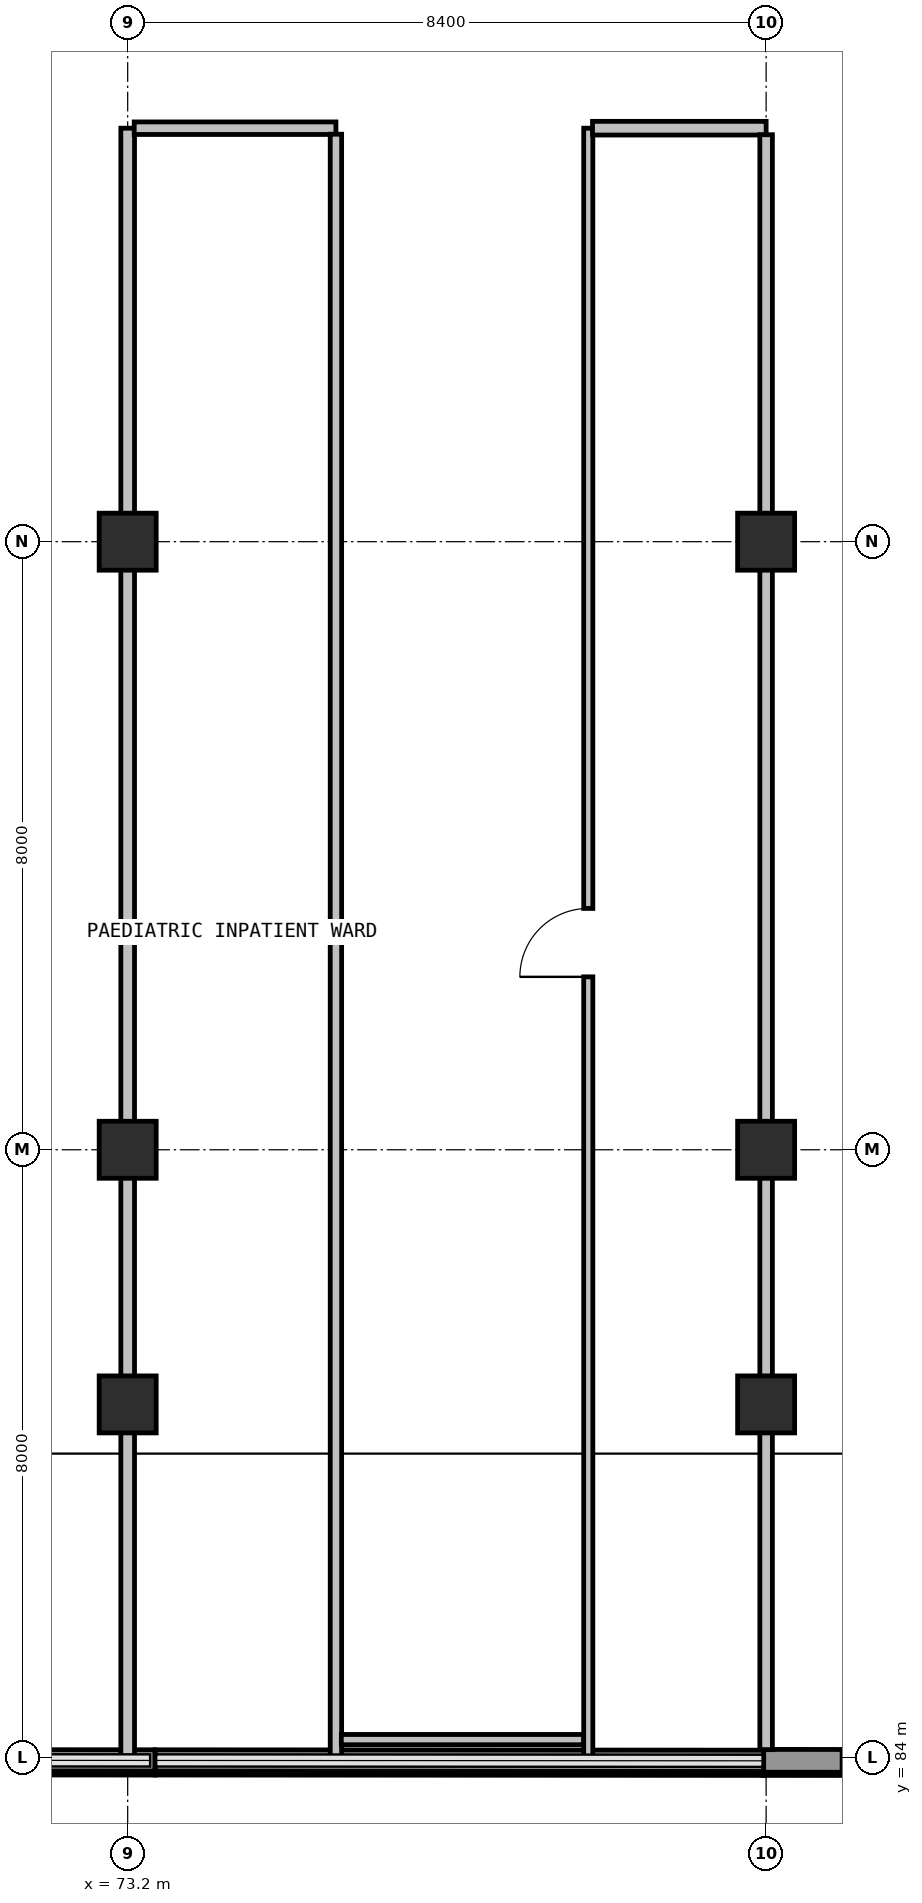
"""IFC4 building model, lengths in metres.
Left out: names, types, materials, properties, quantities, classifications, styles, units other than length and angle.
Written with IfcOpenShell. Run it as: python <this file> out.ifc"""

import sys

from ifc_helpers import new_model, si_unit, direction, frame, frame_2d, origin, origin_2d, place, context, subcontext, project, spatial, rectangle, extrude, element, fill, save


model = new_model("IFC4")
c1 = context("Model", 3, precision=1e-05, world=origin(), true_north=direction((0.0, 1.0)))
c2 = subcontext(c1, "Body", "Model", "MODEL_VIEW")
j1 = project(units=[si_unit("LENGTHUNIT", "METRE"), si_unit("PLANEANGLEUNIT", "RADIAN")], contexts=[c1])
p1 = place(None, origin())
s1 = spatial("IfcSite", under=j1, at=p1, CompositionType="ELEMENT")
p2 = place(p1, origin())
s2 = spatial("IfcBuilding", under=s1, at=p2, CompositionType="ELEMENT")
p3 = place(p2, frame((0.0, 0.0, 19.2)))
s3 = spatial("IfcBuildingStorey", under=s2, at=p3, CompositionType="ELEMENT", Elevation=19.2)
for number, where, z_axis, x_axis in (
    (1, (73.2, 88.65, 0.0), (0.0, 0.0, 1.0), (1.0, 0.0, 0.0)),
    (2, (73.2, 92.0, 0.0), (0.0, 0.0, 1.0), (1.0, 0.0, 0.0)),
    (3, (73.2, 100.0, 0.0), (0.0, 0.0, 1.0), (1.0, 0.0, 0.0)),
    (4, (81.6, 88.65, 0.0), (0.0, 0.0, 1.0), (1.0, 0.0, 0.0)),
    (5, (81.6, 92.0, 0.0), (0.0, 0.0, 1.0), (1.0, 0.0, 0.0)),
    (6, (81.6, 100.0, 0.0), (0.0, 0.0, 1.0), (1.0, 0.0, 0.0)),
):
    element("IfcColumn", number, at=place(p3, frame(where, z_axis=z_axis, x_axis=x_axis)), inside=s3, PredefinedType="COLUMN", context=c2, shape_type="SweptSolid", body=[
        extrude(rectangle(XDim=0.75, YDim=0.75, at=origin_2d()), origin(), (0.0, 0.0, 1.0), 4.05),
    ])
p4 = place(p3, frame((89.576, 83.956, 0.0), z_axis=(0.0, 0.0, 1.0), x_axis=(-0.999999814099, 0.000609755984, 0.0)))
e7 = element("IfcWall", 7, at=p4, inside=s3, PredefinedType="SOLIDWALL", context=c2, shape_type="SweptSolid", body=[
    extrude(rectangle(XDim=8.008, YDim=0.3, at=frame_2d((4.004, 0.0))), origin(), (0.0, 0.0, 1.0), 3.77),
])
p5 = place(p4, frame((1.032, 0.0, 0.96)))
e8 = element("IfcOpeningElement", 8, at=p5, cuts=e7, PredefinedType="OPENING", context=c2, shape_type="SweptSolid", body=[
    extrude(rectangle(XDim=2.1, YDim=1.5, at=frame_2d((1.05, 0.75))), frame((0.0, 0.16, 0.0), z_axis=(0.0, -1.0, 0.0), x_axis=(1.0, 0.0, 0.0)), (0.0, 0.0, 1.0), 0.32),
])
p6 = place(p4, frame((4.876, 0.0, 0.96)))
e9 = element("IfcOpeningElement", 9, at=p6, cuts=e7, PredefinedType="OPENING", context=c2, shape_type="SweptSolid", body=[
    extrude(rectangle(XDim=2.1, YDim=1.5, at=frame_2d((1.05, 0.75))), frame((0.0, 0.16, 0.0), z_axis=(0.0, -1.0, 0.0), x_axis=(1.0, 0.0, 0.0)), (0.0, 0.0, 1.0), 0.32),
])
p7 = place(p3, frame((81.566, 83.961, 0.0), z_axis=(0.0, 0.0, 1.0), x_axis=(-0.999999794844, 0.000640556238, 0.0)))
e10 = element("IfcWall", 10, at=p7, inside=s3, PredefinedType="SOLIDWALL", context=c2, shape_type="SweptSolid", body=[
    extrude(rectangle(XDim=8.004, YDim=0.28, at=frame_2d((4.002, 0.0))), origin(), (0.0, 0.0, 1.0), 0.94),
])
p8 = place(p3, frame((73.558, 83.966, 0.0), z_axis=(0.0, 0.0, 1.0), x_axis=(-0.999999732057, 0.000732041896, 0.0)))
e11 = element("IfcWall", 11, at=p8, inside=s3, PredefinedType="SOLIDWALL", context=c2, shape_type="SweptSolid", body=[
    extrude(rectangle(XDim=8.004, YDim=0.28, at=frame_2d((4.002, 0.0))), origin(), (0.0, 0.0, 1.0), 0.94),
])
p9 = place(p3, frame((73.2, 105.44, 0.0), z_axis=(0.0, 0.0, 1.0), x_axis=(0.0, -1.0, 0.0)))
e12 = element("IfcWall", 12, at=p9, inside=s3, PredefinedType="PARTITIONING", context=c2, shape_type="SweptSolid", body=[
    extrude(rectangle(XDim=21.43, YDim=0.18, at=frame_2d((10.715, 0.0))), origin(), (0.0, 0.0, 1.0), 3.12),
])
p10 = place(p3, frame((73.286, 105.44, 0.0), z_axis=(0.0, 0.0, 1.0), x_axis=(1.0, 0.0, 0.0)))
e13 = element("IfcWall", 13, at=p10, inside=s3, PredefinedType="PARTITIONING", context=c2, shape_type="SweptSolid", body=[
    extrude(rectangle(XDim=2.654, YDim=0.165, at=frame_2d((1.327, 0.0))), origin(), (0.0, 0.0, 1.0), 3.07),
])
p11 = place(p3, frame((75.94, 105.361, 0.0), z_axis=(0.0, 0.0, 1.0), x_axis=(0.0, -1.0, 0.0)))
e14 = element("IfcWall", 14, at=p11, inside=s3, PredefinedType="PARTITIONING", context=c2, shape_type="SweptSolid", body=[
    extrude(rectangle(XDim=21.351, YDim=0.15, at=frame_2d((10.676, 0.0))), origin(), (0.0, 0.0, 1.0), 3.77),
])
p12 = place(p3, frame((76.011, 84.24, 0.0), z_axis=(0.0, 0.0, 1.0), x_axis=(1.0, 0.0, 0.0)))
e15 = element("IfcWall", 15, at=p12, inside=s3, PredefinedType="PARTITIONING", context=c2, shape_type="SweptSolid", body=[
    extrude(rectangle(XDim=3.189, YDim=0.135, at=frame_2d((1.594, 0.0))), origin(), (0.0, 0.0, 1.0), 3.77),
])
p13 = place(p3, frame((79.26, 84.01, 0.0), z_axis=(0.0, 0.0, 1.0), x_axis=(0.0, 1.0, 0.0)))
e16 = element("IfcWall", 16, at=p13, inside=s3, PredefinedType="PARTITIONING", context=c2, shape_type="SweptSolid", body=[
    extrude(rectangle(XDim=21.43, YDim=0.12, at=frame_2d((10.715, 0.0))), origin(), (0.0, 0.0, 1.0), 3.77),
])
p14 = place(p13, frame((10.265, 0.0, 0.0)))
e17 = element("IfcOpeningElement", 17, at=p14, cuts=e16, PredefinedType="OPENING", context=c2, shape_type="SweptSolid", body=[
    extrude(rectangle(XDim=0.9, YDim=2.1, at=frame_2d((0.45, 1.05))), frame((0.0, 0.07, 0.0), z_axis=(0.0, -1.0, 0.0), x_axis=(1.0, 0.0, 0.0)), (0.0, 0.0, 1.0), 0.14),
])
p15 = place(p3, frame((79.316, 105.44, 0.0), z_axis=(0.0, 0.0, 1.0), x_axis=(1.0, 0.0, 0.0)))
e18 = element("IfcWall", 18, at=p15, inside=s3, PredefinedType="PARTITIONING", context=c2, shape_type="SweptSolid", body=[
    extrude(rectangle(XDim=2.284, YDim=0.18, at=frame_2d((1.142, 0.0))), origin(), (0.0, 0.0, 1.0), 3.07),
])
p16 = place(p3, frame((81.6, 105.354, 0.0), z_axis=(0.0, 0.0, 1.0), x_axis=(0.0, -1.0, 0.0)))
e19 = element("IfcWall", 19, at=p16, inside=s3, PredefinedType="PARTITIONING", context=c2, shape_type="SweptSolid", body=[
    extrude(rectangle(XDim=21.246, YDim=0.165, at=frame_2d((10.623, 0.0))), origin(), (0.0, 0.0, 1.0), 3.12),
])
p17 = place(p6, origin())
e20 = element("IfcWindow", 20, at=p17, inside=s3, PartitioningType="SINGLE_PANEL", PredefinedType="WINDOW", context=c2, shape_type="SweptSolid", body=[
    extrude(rectangle(XDim=2.1, YDim=1.5, at=frame_2d((1.05, 0.75))), frame((0.0, 0.03, 0.0), z_axis=(0.0, -1.0, 0.0), x_axis=(1.0, 0.0, 0.0)), (0.0, 0.0, 1.0), 0.06),
])
fill(e9, e20)
p18 = place(p14, origin())
e21 = element("IfcDoor", 21, at=p18, inside=s3, OperationType="SINGLE_SWING_LEFT", PredefinedType="DOOR", context=c2, shape_type="SweptSolid", body=[
    extrude(rectangle(XDim=0.9, YDim=2.1, at=frame_2d((0.45, 1.05))), frame((0.0, 0.025, 0.0), z_axis=(0.0, -1.0, 0.0), x_axis=(1.0, 0.0, 0.0)), (0.0, 0.0, 1.0), 0.05),
])
fill(e17, e21)
save(model, sys.argv[1])
